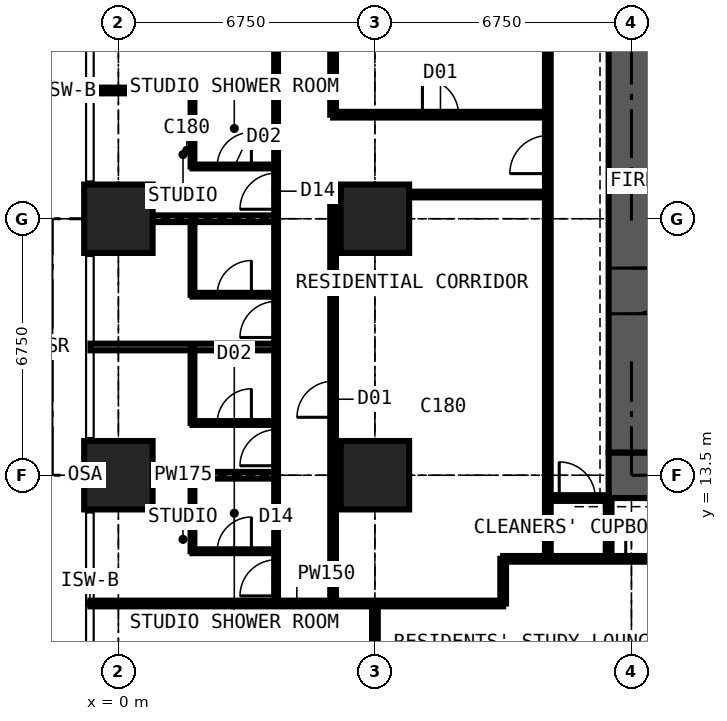
"""IFC4 building model, lengths in metres.
Left out: names, types, materials, properties, quantities, classifications, styles, units other than length and angle.
Written with IfcOpenShell. Run it as: python <this file> out.ifc"""

import sys

from ifc_helpers import new_model, si_unit, direction, frame, frame_2d, origin, origin_2d, place, context, subcontext, project, spatial, rectangle, extrude, element, fill, save


model = new_model("IFC4")
c1 = context("Model", 3, precision=1e-05, world=origin(), true_north=direction((0.0, 1.0)))
c2 = subcontext(c1, "Body", "Model", "MODEL_VIEW")
j1 = project(units=[si_unit("LENGTHUNIT", "METRE"), si_unit("PLANEANGLEUNIT", "RADIAN")], contexts=[c1])
p1 = place(None, origin())
s1 = spatial("IfcSite", under=j1, at=p1, CompositionType="ELEMENT")
p2 = place(p1, origin())
s2 = spatial("IfcBuilding", under=s1, at=p2, CompositionType="ELEMENT")
p3 = place(p2, frame((0.0, 0.0, 98.1)))
s3 = spatial("IfcBuildingStorey", under=s2, at=p3, CompositionType="ELEMENT", Elevation=98.1)
for number, where, z_axis, x_axis in (
    (1, (0.0, 13.5, 0.0), (0.0, 0.0, 1.0), (1.0, 0.0, 0.0)),
    (2, (0.0, 20.25, 0.0), (0.0, 0.0, 1.0), (1.0, 0.0, 0.0)),
    (3, (6.75, 13.5, 0.0), (0.0, 0.0, 1.0), (1.0, 0.0, 0.0)),
    (4, (6.75, 20.25, 0.0), (0.0, 0.0, 1.0), (1.0, 0.0, 0.0)),
):
    element("IfcColumn", number, at=place(p3, frame(where, z_axis=z_axis, x_axis=x_axis)), inside=s3, PredefinedType="COLUMN", context=c2, shape_type="SweptSolid", body=[
        extrude(rectangle(XDim=1.8, YDim=1.8, at=origin_2d()), origin(), (0.0, 0.0, 1.0), 3.6),
    ])
p4 = place(p3, frame((12.9, 13.5, 0.0), z_axis=(0.0, 0.0, 1.0), x_axis=(1.0, 0.0, 0.0)))
e5 = element("IfcWall", 5, at=p4, inside=s3, PredefinedType="SHEAR", context=c2, shape_type="SweptSolid", body=[
    extrude(rectangle(XDim=14.7, YDim=1.2, at=frame_2d((7.35, 0.0))), origin(), (0.0, 0.0, 1.0), 3.6),
])
p5 = place(p3, frame((13.5, 26.4, 0.0), z_axis=(0.0, 0.0, 1.0), x_axis=(0.0, -1.0, 0.0)))
e6 = element("IfcWall", 6, at=p5, inside=s3, PredefinedType="SHEAR", context=c2, shape_type="SweptSolid", body=[
    extrude(rectangle(XDim=12.3, YDim=1.2, at=frame_2d((6.15, 0.0))), origin(), (0.0, 0.0, 1.0), 3.6),
])
p6 = place(p5, frame((7.45, 0.0, 0.0)))
e7 = element("IfcOpeningElement", 7, at=p6, cuts=e6, PredefinedType="OPENING", context=c2, shape_type="SweptSolid", body=[
    extrude(rectangle(XDim=1.2, YDim=2.2, at=frame_2d((0.6, 1.1))), frame((0.0, 0.61, 0.0), z_axis=(0.0, -1.0, 0.0), x_axis=(1.0, 0.0, 0.0)), (0.0, 0.0, 1.0), 1.22),
])
p7 = place(p3, frame((-0.734, 10.125, 0.0), z_axis=(0.0, 0.0, 1.0), x_axis=(1.0, 0.0, 0.0)))
e8 = element("IfcWall", 8, at=p7, inside=s3, PredefinedType="PARTITIONING", context=c2, shape_type="SweptSolid", body=[
    extrude(rectangle(XDim=10.859, YDim=0.15, at=frame_2d((5.429, 0.0))), origin(), (0.0, 0.0, 1.0), 3.375),
])
p8 = place(p3, frame((-0.734, 13.5, 0.0), z_axis=(0.0, 0.0, 1.0), x_axis=(1.0, 0.0, 0.0)))
e9 = element("IfcWall", 9, at=p8, inside=s3, PredefinedType="PARTITIONING", context=c2, shape_type="SweptSolid", body=[
    extrude(rectangle(XDim=4.884, YDim=0.175, at=frame_2d((2.442, 0.0))), origin(), (0.0, 0.0, 1.0), 2.61),
])
p9 = place(p3, frame((-0.734, 16.875, 0.0), z_axis=(0.0, 0.0, 1.0), x_axis=(1.0, 0.0, 0.0)))
e10 = element("IfcWall", 10, at=p9, inside=s3, PredefinedType="PARTITIONING", context=c2, shape_type="SweptSolid", body=[
    extrude(rectangle(XDim=4.884, YDim=0.175, at=frame_2d((2.442, 0.0))), origin(), (0.0, 0.0, 1.0), 3.375),
])
p10 = place(p3, frame((-0.734, 20.25, 0.0), z_axis=(0.0, 0.0, 1.0), x_axis=(1.0, 0.0, 0.0)))
e11 = element("IfcWall", 11, at=p10, inside=s3, PredefinedType="PARTITIONING", context=c2, shape_type="SweptSolid", body=[
    extrude(rectangle(XDim=4.884, YDim=0.175, at=frame_2d((2.442, 0.0))), origin(), (0.0, 0.0, 1.0), 2.61),
])
p11 = place(p3, frame((-0.734, 23.625, 0.0), z_axis=(0.0, 0.0, 1.0), x_axis=(1.0, 0.0, 0.0)))
e12 = element("IfcWall", 12, at=p11, inside=s3, PredefinedType="PARTITIONING", context=c2, shape_type="SweptSolid", body=[
    extrude(rectangle(XDim=4.884, YDim=0.15, at=frame_2d((2.442, 0.0))), origin(), (0.0, 0.0, 1.0), 3.375),
])
p12 = place(p3, frame((1.95, 11.5, 0.0), z_axis=(0.0, 0.0, 1.0), x_axis=(0.0, 1.0, 0.0)))
e13 = element("IfcWall", 13, at=p12, inside=s3, PredefinedType="PARTITIONING", context=c2, shape_type="SweptSolid", body=[
    extrude(rectangle(XDim=2.0, YDim=0.1, at=frame_2d((1.0, 0.0))), origin(), (0.0, 0.0, 1.0), 3.375),
])
p13 = place(p3, frame((1.95, 11.5, 0.0), z_axis=(0.0, 0.0, 1.0), x_axis=(1.0, 0.0, 0.0)))
e14 = element("IfcWall", 14, at=p13, inside=s3, PredefinedType="PARTITIONING", context=c2, shape_type="SweptSolid", body=[
    extrude(rectangle(XDim=2.2, YDim=0.1, at=frame_2d((1.1, 0.0))), origin(), (0.0, 0.0, 1.0), 3.375),
])
p14 = place(p13, frame((0.65, 0.0, 0.0)))
e15 = element("IfcOpeningElement", 15, at=p14, cuts=e14, PredefinedType="OPENING", context=c2, shape_type="SweptSolid", body=[
    extrude(rectangle(XDim=0.9, YDim=2.2, at=frame_2d((0.45, 1.1))), frame((0.0, 0.06, 0.0), z_axis=(0.0, -1.0, 0.0), x_axis=(1.0, 0.0, 0.0)), (0.0, 0.0, 1.0), 0.12),
])
p15 = place(p3, frame((1.95, 14.875, 0.0), z_axis=(0.0, 0.0, 1.0), x_axis=(0.0, 1.0, 0.0)))
e16 = element("IfcWall", 16, at=p15, inside=s3, PredefinedType="PARTITIONING", context=c2, shape_type="SweptSolid", body=[
    extrude(rectangle(XDim=2.0, YDim=0.1, at=frame_2d((1.0, 0.0))), origin(), (0.0, 0.0, 1.0), 3.375),
])
p16 = place(p3, frame((1.95, 14.875, 0.0), z_axis=(0.0, 0.0, 1.0), x_axis=(1.0, 0.0, 0.0)))
e17 = element("IfcWall", 17, at=p16, inside=s3, PredefinedType="PARTITIONING", context=c2, shape_type="SweptSolid", body=[
    extrude(rectangle(XDim=2.2, YDim=0.1, at=frame_2d((1.1, 0.0))), origin(), (0.0, 0.0, 1.0), 3.375),
])
p17 = place(p16, frame((0.65, 0.0, 0.0)))
e18 = element("IfcOpeningElement", 18, at=p17, cuts=e17, PredefinedType="OPENING", context=c2, shape_type="SweptSolid", body=[
    extrude(rectangle(XDim=0.9, YDim=2.2, at=frame_2d((0.45, 1.1))), frame((0.0, 0.06, 0.0), z_axis=(0.0, -1.0, 0.0), x_axis=(1.0, 0.0, 0.0)), (0.0, 0.0, 1.0), 0.12),
])
p18 = place(p3, frame((1.95, 18.25, 0.0), z_axis=(0.0, 0.0, 1.0), x_axis=(0.0, 1.0, 0.0)))
e19 = element("IfcWall", 19, at=p18, inside=s3, PredefinedType="PARTITIONING", context=c2, shape_type="SweptSolid", body=[
    extrude(rectangle(XDim=2.0, YDim=0.1, at=frame_2d((1.0, 0.0))), origin(), (0.0, 0.0, 1.0), 3.375),
])
p19 = place(p3, frame((1.95, 18.25, 0.0), z_axis=(0.0, 0.0, 1.0), x_axis=(1.0, 0.0, 0.0)))
e20 = element("IfcWall", 20, at=p19, inside=s3, PredefinedType="PARTITIONING", context=c2, shape_type="SweptSolid", body=[
    extrude(rectangle(XDim=2.2, YDim=0.1, at=frame_2d((1.1, 0.0))), origin(), (0.0, 0.0, 1.0), 3.375),
])
p20 = place(p19, frame((0.65, 0.0, 0.0)))
e21 = element("IfcOpeningElement", 21, at=p20, cuts=e20, PredefinedType="OPENING", context=c2, shape_type="SweptSolid", body=[
    extrude(rectangle(XDim=0.9, YDim=2.2, at=frame_2d((0.45, 1.1))), frame((0.0, 0.06, 0.0), z_axis=(0.0, -1.0, 0.0), x_axis=(1.0, 0.0, 0.0)), (0.0, 0.0, 1.0), 0.12),
])
p21 = place(p3, frame((1.95, 21.625, 0.0), z_axis=(0.0, 0.0, 1.0), x_axis=(0.0, 1.0, 0.0)))
e22 = element("IfcWall", 22, at=p21, inside=s3, PredefinedType="PARTITIONING", context=c2, shape_type="SweptSolid", body=[
    extrude(rectangle(XDim=2.0, YDim=0.1, at=frame_2d((1.0, 0.0))), origin(), (0.0, 0.0, 1.0), 3.375),
])
p22 = place(p3, frame((1.95, 21.625, 0.0), z_axis=(0.0, 0.0, 1.0), x_axis=(1.0, 0.0, 0.0)))
e23 = element("IfcWall", 23, at=p22, inside=s3, PredefinedType="PARTITIONING", context=c2, shape_type="SweptSolid", body=[
    extrude(rectangle(XDim=2.2, YDim=0.1, at=frame_2d((1.1, 0.0))), origin(), (0.0, 0.0, 1.0), 3.375),
])
p23 = place(p22, frame((0.65, 0.0, 0.0)))
e24 = element("IfcOpeningElement", 24, at=p23, cuts=e23, PredefinedType="OPENING", context=c2, shape_type="SweptSolid", body=[
    extrude(rectangle(XDim=0.9, YDim=2.2, at=frame_2d((0.45, 1.1))), frame((0.0, 0.06, 0.0), z_axis=(0.0, -1.0, 0.0), x_axis=(1.0, 0.0, 0.0)), (0.0, 0.0, 1.0), 0.12),
])
p24 = place(p3, frame((4.15, 10.125, 0.0), z_axis=(0.0, 0.0, 1.0), x_axis=(0.0, 1.0, 0.0)))
e25 = element("IfcWall", 25, at=p24, inside=s3, PredefinedType="PARTITIONING", context=c2, shape_type="SweptSolid", body=[
    extrude(rectangle(XDim=16.875, YDim=0.1, at=frame_2d((8.438, 0.0))), origin(), (0.0, 0.0, 1.0), 3.375),
])
p25 = place(p24, frame((0.2, 0.0, 0.0)))
e26 = element("IfcOpeningElement", 26, at=p25, cuts=e25, PredefinedType="OPENING", context=c2, shape_type="SweptSolid", body=[
    extrude(rectangle(XDim=0.95, YDim=2.2, at=frame_2d((0.475, 1.1))), frame((0.0, 0.06, 0.0), z_axis=(0.0, -1.0, 0.0), x_axis=(1.0, 0.0, 0.0)), (0.0, 0.0, 1.0), 0.12),
])
p26 = place(p24, frame((3.625, 0.0, 0.0)))
e27 = element("IfcOpeningElement", 27, at=p26, cuts=e25, PredefinedType="OPENING", context=c2, shape_type="SweptSolid", body=[
    extrude(rectangle(XDim=0.95, YDim=2.2, at=frame_2d((0.475, 1.1))), frame((0.0, 0.06, 0.0), z_axis=(0.0, -1.0, 0.0), x_axis=(1.0, 0.0, 0.0)), (0.0, 0.0, 1.0), 0.12),
])
p27 = place(p24, frame((7.0, 0.0, 0.0)))
e28 = element("IfcOpeningElement", 28, at=p27, cuts=e25, PredefinedType="OPENING", context=c2, shape_type="SweptSolid", body=[
    extrude(rectangle(XDim=0.95, YDim=2.2, at=frame_2d((0.475, 1.1))), frame((0.0, 0.06, 0.0), z_axis=(0.0, -1.0, 0.0), x_axis=(1.0, 0.0, 0.0)), (0.0, 0.0, 1.0), 0.12),
])
p28 = place(p24, frame((10.375, 0.0, 0.0)))
e29 = element("IfcOpeningElement", 29, at=p28, cuts=e25, PredefinedType="OPENING", context=c2, shape_type="SweptSolid", body=[
    extrude(rectangle(XDim=0.95, YDim=2.2, at=frame_2d((0.475, 1.1))), frame((0.0, 0.06, 0.0), z_axis=(0.0, -1.0, 0.0), x_axis=(1.0, 0.0, 0.0)), (0.0, 0.0, 1.0), 0.12),
])
p29 = place(p3, frame((5.65, 10.125, 0.0), z_axis=(0.0, 0.0, 1.0), x_axis=(0.0, 1.0, 0.0)))
e30 = element("IfcWall", 30, at=p29, inside=s3, PredefinedType="PARTITIONING", context=c2, shape_type="SweptSolid", body=[
    extrude(rectangle(XDim=10.762, YDim=0.15, at=frame_2d((5.381, 0.0))), origin(), (0.0, 0.0, 1.0), 3.375),
])
p30 = place(p29, frame((4.9, 0.0, 0.0)))
e31 = element("IfcOpeningElement", 31, at=p30, cuts=e30, PredefinedType="OPENING", context=c2, shape_type="SweptSolid", body=[
    extrude(rectangle(XDim=0.95, YDim=2.2, at=frame_2d((0.475, 1.1))), frame((0.0, 0.085, 0.0), z_axis=(0.0, -1.0, 0.0), x_axis=(1.0, 0.0, 0.0)), (0.0, 0.0, 1.0), 0.17),
])
p31 = place(p3, frame((5.65, 20.887, 0.0), z_axis=(0.0, 0.0, 1.0), x_axis=(1.0, 0.0, 0.0)))
e32 = element("IfcWall", 32, at=p31, inside=s3, PredefinedType="PARTITIONING", context=c2, shape_type="SweptSolid", body=[
    extrude(rectangle(XDim=5.65, YDim=0.15, at=frame_2d((2.825, 0.0))), origin(), (0.0, 0.0, 1.0), 3.375),
])
p32 = place(p3, frame((5.65, 22.988, 0.0), z_axis=(0.0, 0.0, 1.0), x_axis=(0.0, 1.0, 0.0)))
e33 = element("IfcWall", 33, at=p32, inside=s3, PredefinedType="PARTITIONING", context=c2, shape_type="SweptSolid", body=[
    extrude(rectangle(XDim=4.012, YDim=0.15, at=frame_2d((2.006, 0.0))), origin(), (0.0, 0.0, 1.0), 3.375),
])
p33 = place(p3, frame((5.65, 22.988, 0.0), z_axis=(0.0, 0.0, 1.0), x_axis=(1.0, 0.0, 0.0)))
e34 = element("IfcWall", 34, at=p33, inside=s3, PredefinedType="PARTITIONING", context=c2, shape_type="SweptSolid", body=[
    extrude(rectangle(XDim=5.65, YDim=0.15, at=frame_2d((2.825, 0.0))), origin(), (0.0, 0.0, 1.0), 3.375),
])
p34 = place(p33, frame((2.35, 0.0, 0.0)))
e35 = element("IfcOpeningElement", 35, at=p34, cuts=e34, PredefinedType="OPENING", context=c2, shape_type="SweptSolid", body=[
    extrude(rectangle(XDim=0.95, YDim=2.2, at=frame_2d((0.475, 1.1))), frame((0.0, 0.085, 0.0), z_axis=(0.0, -1.0, 0.0), x_axis=(1.0, 0.0, 0.0)), (0.0, 0.0, 1.0), 0.17),
])
p35 = place(p3, frame((6.75, 4.15, 0.0), z_axis=(0.0, 0.0, 1.0), x_axis=(0.0, 1.0, 0.0)))
e36 = element("IfcWall", 36, at=p35, inside=s3, PredefinedType="PARTITIONING", context=c2, shape_type="SweptSolid", body=[
    extrude(rectangle(XDim=5.975, YDim=0.15, at=frame_2d((2.988, 0.0))), origin(), (0.0, 0.0, 1.0), 2.877),
])
p36 = place(p3, frame((10.125, 10.125, 0.0), z_axis=(0.0, 0.0, 1.0), x_axis=(0.0, 1.0, 0.0)))
e37 = element("IfcWall", 37, at=p36, inside=s3, PredefinedType="PARTITIONING", context=c2, shape_type="SweptSolid", body=[
    extrude(rectangle(XDim=1.175, YDim=0.15, at=frame_2d((0.587, 0.0))), origin(), (0.0, 0.0, 1.0), 3.375),
])
p37 = place(p3, frame((10.125, 11.3, 0.0), z_axis=(0.0, 0.0, 1.0), x_axis=(1.0, 0.0, 0.0)))
e38 = element("IfcWall", 38, at=p37, inside=s3, PredefinedType="PARTITIONING", context=c2, shape_type="SweptSolid", body=[
    extrude(rectangle(XDim=20.675, YDim=0.15, at=frame_2d((10.337, 0.0))), origin(), (0.0, 0.0, 1.0), 3.375),
])
p38 = place(p37, frame((5.2, 0.0, 0.0)))
e39 = element("IfcOpeningElement", 39, at=p38, cuts=e38, PredefinedType="OPENING", context=c2, shape_type="SweptSolid", body=[
    extrude(rectangle(XDim=1.0, YDim=2.2, at=frame_2d((0.5, 1.1))), frame((0.0, 0.085, 0.0), z_axis=(0.0, -1.0, 0.0), x_axis=(1.0, 0.0, 0.0)), (0.0, 0.0, 1.0), 0.17),
])
p39 = place(p37, frame((11.312, 0.0, 0.0)))
e40 = element("IfcOpeningElement", 40, at=p39, cuts=e38, PredefinedType="OPENING", context=c2, shape_type="SweptSolid", body=[
    extrude(rectangle(XDim=1.0, YDim=2.2, at=frame_2d((0.5, 1.1))), frame((0.0, 0.085, 0.0), z_axis=(0.0, -1.0, 0.0), x_axis=(1.0, 0.0, 0.0)), (0.0, 0.0, 1.0), 0.17),
])
p40 = place(p37, frame((3.225, 0.0, 0.0)))
e41 = element("IfcOpeningElement", 41, at=p40, cuts=e38, PredefinedType="OPENING", context=c2, shape_type="SweptSolid", body=[
    extrude(rectangle(XDim=0.95, YDim=2.2, at=frame_2d((0.475, 1.1))), frame((0.0, 0.085, 0.0), z_axis=(0.0, -1.0, 0.0), x_axis=(1.0, 0.0, 0.0)), (0.0, 0.0, 1.0), 0.17),
])
p41 = place(p3, frame((11.3, 11.3, 0.0), z_axis=(0.0, 0.0, 1.0), x_axis=(0.0, 1.0, 0.0)))
e42 = element("IfcWall", 42, at=p41, inside=s3, PredefinedType="PARTITIONING", context=c2, shape_type="SweptSolid", body=[
    extrude(rectangle(XDim=19.3, YDim=0.15, at=frame_2d((9.65, 0.0))), origin(), (0.0, 0.0, 1.0), 3.375),
])
p42 = place(p41, frame((18.1, 0.0, 0.0)))
e43 = element("IfcOpeningElement", 43, at=p42, cuts=e42, PredefinedType="OPENING", context=c2, shape_type="SweptSolid", body=[
    extrude(rectangle(XDim=1.0, YDim=2.2, at=frame_2d((0.5, 1.1))), frame((0.0, 0.085, 0.0), z_axis=(0.0, -1.0, 0.0), x_axis=(1.0, 0.0, 0.0)), (0.0, 0.0, 1.0), 0.17),
])
p43 = place(p41, frame((10.137, 0.0, 0.0)))
e44 = element("IfcOpeningElement", 44, at=p43, cuts=e42, PredefinedType="OPENING", context=c2, shape_type="SweptSolid", body=[
    extrude(rectangle(XDim=1.0, YDim=2.2, at=frame_2d((0.5, 1.1))), frame((0.0, 0.085, 0.0), z_axis=(0.0, -1.0, 0.0), x_axis=(1.0, 0.0, 0.0)), (0.0, 0.0, 1.0), 0.17),
])
p44 = place(p3, frame((11.3, 12.9, 0.0), z_axis=(0.0, 0.0, 1.0), x_axis=(1.0, 0.0, 0.0)))
e45 = element("IfcWall", 45, at=p44, inside=s3, PredefinedType="PARTITIONING", context=c2, shape_type="SweptSolid", body=[
    extrude(rectangle(XDim=1.6, YDim=0.15, at=frame_2d((0.8, 0.0))), origin(), (0.0, 0.0, 1.0), 2.806),
])
p45 = place(p44, frame((0.3, 0.0, 0.0)))
e46 = element("IfcOpeningElement", 46, at=p45, cuts=e45, PredefinedType="OPENING", context=c2, shape_type="SweptSolid", body=[
    extrude(rectangle(XDim=0.95, YDim=2.2, at=frame_2d((0.475, 1.1))), frame((0.0, 0.085, 0.0), z_axis=(0.0, -1.0, 0.0), x_axis=(1.0, 0.0, 0.0)), (0.0, 0.0, 1.0), 0.17),
])
p46 = place(p3, frame((12.9, 11.3, 0.0), z_axis=(0.0, 0.0, 1.0), x_axis=(0.0, 1.0, 0.0)))
e47 = element("IfcWall", 47, at=p46, inside=s3, PredefinedType="PARTITIONING", context=c2, shape_type="SweptSolid", body=[
    extrude(rectangle(XDim=1.6, YDim=0.15, at=frame_2d((0.8, 0.0))), origin(), (0.0, 0.0, 1.0), 3.375),
])
p47 = place(p6, origin())
e48 = element("IfcDoor", 48, at=p47, inside=s3, OperationType="DOUBLE_DOOR_SINGLE_SWING", PredefinedType="DOOR", context=c2, shape_type="SweptSolid", body=[
    extrude(rectangle(XDim=1.2, YDim=2.2, at=frame_2d((0.6, 1.1))), frame((0.0, 0.025, 0.0), z_axis=(0.0, -1.0, 0.0), x_axis=(1.0, 0.0, 0.0)), (0.0, 0.0, 1.0), 0.05),
])
fill(e7, e48)
p48 = place(p45, origin())
e49 = element("IfcDoor", 49, at=p48, inside=s3, OperationType="SINGLE_SWING_LEFT", PredefinedType="DOOR", context=c2, shape_type="SweptSolid", body=[
    extrude(rectangle(XDim=0.95, YDim=2.2, at=frame_2d((0.475, 1.1))), frame((0.0, 0.025, 0.0), z_axis=(0.0, -1.0, 0.0), x_axis=(1.0, 0.0, 0.0)), (0.0, 0.0, 1.0), 0.05),
])
fill(e46, e49)
p49 = place(p40, origin())
e50 = element("IfcDoor", 50, at=p49, inside=s3, OperationType="SINGLE_SWING_LEFT", PredefinedType="DOOR", context=c2, shape_type="SweptSolid", body=[
    extrude(rectangle(XDim=0.95, YDim=2.2, at=frame_2d((0.475, 1.1))), frame((0.0, 0.025, 0.0), z_axis=(0.0, -1.0, 0.0), x_axis=(1.0, 0.0, 0.0)), (0.0, 0.0, 1.0), 0.05),
])
fill(e41, e50)
p50 = place(p25, origin())
e51 = element("IfcDoor", 51, at=p50, inside=s3, OperationType="SINGLE_SWING_LEFT", PredefinedType="DOOR", context=c2, shape_type="SweptSolid", body=[
    extrude(rectangle(XDim=0.95, YDim=2.2, at=frame_2d((0.475, 1.1))), frame((0.0, 0.025, 0.0), z_axis=(0.0, -1.0, 0.0), x_axis=(1.0, 0.0, 0.0)), (0.0, 0.0, 1.0), 0.05),
])
fill(e26, e51)
p51 = place(p14, origin())
e52 = element("IfcDoor", 52, at=p51, inside=s3, OperationType="SINGLE_SWING_RIGHT", PredefinedType="DOOR", context=c2, shape_type="SweptSolid", body=[
    extrude(rectangle(XDim=0.9, YDim=2.2, at=frame_2d((0.45, 1.1))), frame((0.0, 0.025, 0.0), z_axis=(0.0, -1.0, 0.0), x_axis=(1.0, 0.0, 0.0)), (0.0, 0.0, 1.0), 0.05),
])
fill(e15, e52)
p52 = place(p26, origin())
e53 = element("IfcDoor", 53, at=p52, inside=s3, OperationType="SINGLE_SWING_LEFT", PredefinedType="DOOR", context=c2, shape_type="SweptSolid", body=[
    extrude(rectangle(XDim=0.95, YDim=2.2, at=frame_2d((0.475, 1.1))), frame((0.0, 0.025, 0.0), z_axis=(0.0, -1.0, 0.0), x_axis=(1.0, 0.0, 0.0)), (0.0, 0.0, 1.0), 0.05),
])
fill(e27, e53)
p53 = place(p17, origin())
e54 = element("IfcDoor", 54, at=p53, inside=s3, OperationType="SINGLE_SWING_RIGHT", PredefinedType="DOOR", context=c2, shape_type="SweptSolid", body=[
    extrude(rectangle(XDim=0.9, YDim=2.2, at=frame_2d((0.45, 1.1))), frame((0.0, 0.025, 0.0), z_axis=(0.0, -1.0, 0.0), x_axis=(1.0, 0.0, 0.0)), (0.0, 0.0, 1.0), 0.05),
])
fill(e18, e54)
p54 = place(p27, origin())
e55 = element("IfcDoor", 55, at=p54, inside=s3, OperationType="SINGLE_SWING_LEFT", PredefinedType="DOOR", context=c2, shape_type="SweptSolid", body=[
    extrude(rectangle(XDim=0.95, YDim=2.2, at=frame_2d((0.475, 1.1))), frame((0.0, 0.025, 0.0), z_axis=(0.0, -1.0, 0.0), x_axis=(1.0, 0.0, 0.0)), (0.0, 0.0, 1.0), 0.05),
])
fill(e28, e55)
p55 = place(p20, origin())
e56 = element("IfcDoor", 56, at=p55, inside=s3, OperationType="SINGLE_SWING_RIGHT", PredefinedType="DOOR", context=c2, shape_type="SweptSolid", body=[
    extrude(rectangle(XDim=0.9, YDim=2.2, at=frame_2d((0.45, 1.1))), frame((0.0, 0.025, 0.0), z_axis=(0.0, -1.0, 0.0), x_axis=(1.0, 0.0, 0.0)), (0.0, 0.0, 1.0), 0.05),
])
fill(e21, e56)
p56 = place(p28, origin())
e57 = element("IfcDoor", 57, at=p56, inside=s3, OperationType="SINGLE_SWING_LEFT", PredefinedType="DOOR", context=c2, shape_type="SweptSolid", body=[
    extrude(rectangle(XDim=0.95, YDim=2.2, at=frame_2d((0.475, 1.1))), frame((0.0, 0.025, 0.0), z_axis=(0.0, -1.0, 0.0), x_axis=(1.0, 0.0, 0.0)), (0.0, 0.0, 1.0), 0.05),
])
fill(e29, e57)
p57 = place(p23, origin())
e58 = element("IfcDoor", 58, at=p57, inside=s3, OperationType="SINGLE_SWING_RIGHT", PredefinedType="DOOR", context=c2, shape_type="SweptSolid", body=[
    extrude(rectangle(XDim=0.9, YDim=2.2, at=frame_2d((0.45, 1.1))), frame((0.0, 0.025, 0.0), z_axis=(0.0, -1.0, 0.0), x_axis=(1.0, 0.0, 0.0)), (0.0, 0.0, 1.0), 0.05),
])
fill(e24, e58)
p58 = place(p43, origin())
e59 = element("IfcDoor", 59, at=p58, inside=s3, OperationType="SINGLE_SWING_LEFT", PredefinedType="DOOR", context=c2, shape_type="SweptSolid", body=[
    extrude(rectangle(XDim=1.0, YDim=2.2, at=frame_2d((0.5, 1.1))), frame((0.0, 0.025, 0.0), z_axis=(0.0, -1.0, 0.0), x_axis=(1.0, 0.0, 0.0)), (0.0, 0.0, 1.0), 0.05),
])
fill(e44, e59)
p59 = place(p30, origin())
e60 = element("IfcDoor", 60, at=p59, inside=s3, OperationType="SINGLE_SWING_LEFT", PredefinedType="DOOR", context=c2, shape_type="SweptSolid", body=[
    extrude(rectangle(XDim=0.95, YDim=2.2, at=frame_2d((0.475, 1.1))), frame((0.0, 0.025, 0.0), z_axis=(0.0, -1.0, 0.0), x_axis=(1.0, 0.0, 0.0)), (0.0, 0.0, 1.0), 0.05),
])
fill(e31, e60)
p60 = place(p34, origin())
e61 = element("IfcDoor", 61, at=p60, inside=s3, OperationType="SINGLE_SWING_LEFT", PredefinedType="DOOR", context=c2, shape_type="SweptSolid", body=[
    extrude(rectangle(XDim=0.95, YDim=2.2, at=frame_2d((0.475, 1.1))), frame((0.0, 0.025, 0.0), z_axis=(0.0, -1.0, 0.0), x_axis=(1.0, 0.0, 0.0)), (0.0, 0.0, 1.0), 0.05),
])
fill(e35, e61)
save(model, sys.argv[1])
